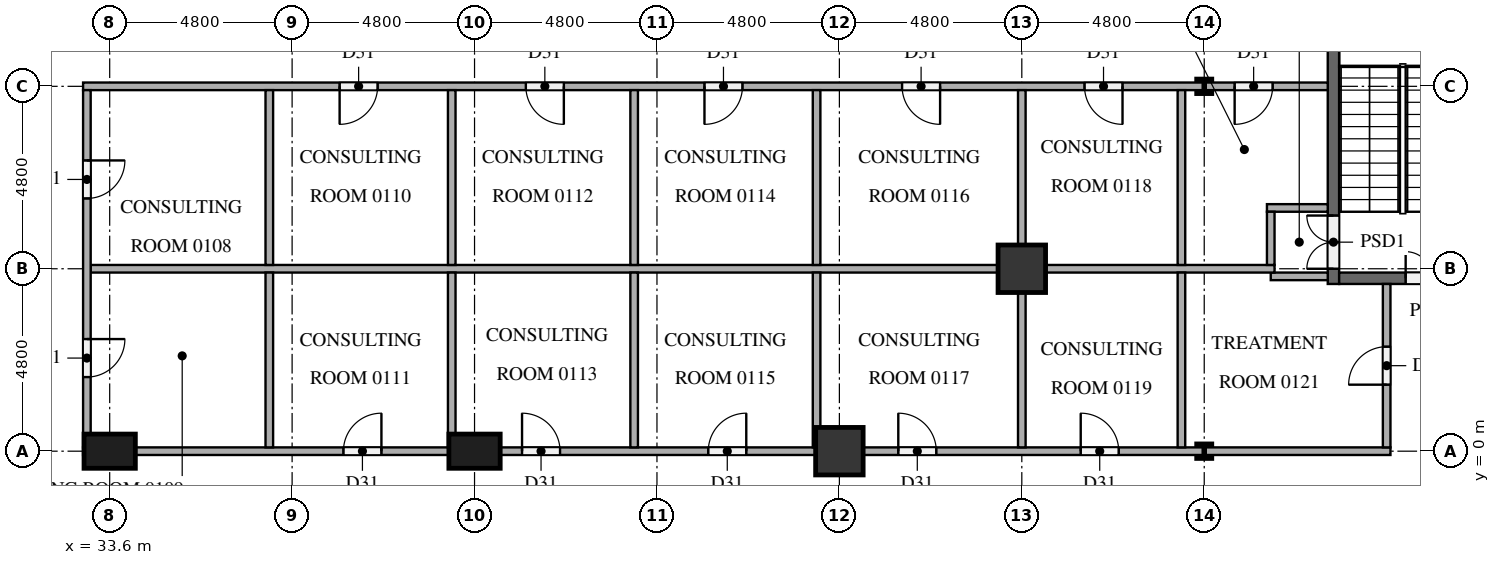
"""IFC4 building model, lengths in metres.
Left out: names, types, materials, properties, quantities, classifications, styles, units other than length and angle.
Written with IfcOpenShell. Run it as: python <this file> out.ifc"""

import sys

from ifc_helpers import new_model, si_unit, direction, frame, frame_2d, origin, origin_2d, place, context, subcontext, project, spatial, rectangle, i_section, extrude, element, fill, save


model = new_model("IFC4")
c1 = context("Model", 3, precision=1e-05, world=origin(), true_north=direction((0.0, 1.0)))
c2 = subcontext(c1, "Body", "Model", "MODEL_VIEW")
j1 = project(units=[si_unit("LENGTHUNIT", "METRE"), si_unit("PLANEANGLEUNIT", "RADIAN")], contexts=[c1])
p1 = place(None, origin())
s1 = spatial("IfcSite", under=j1, at=p1, CompositionType="ELEMENT")
p2 = place(p1, origin())
s2 = spatial("IfcBuilding", under=s1, at=p2, CompositionType="ELEMENT")
p3 = place(p2, frame((0.0, 0.0, 6.0)))
s3 = spatial("IfcBuildingStorey", under=s2, at=p3, CompositionType="ELEMENT", Elevation=6.0)
p4 = place(p3, frame((65.8, 4.4, 0.0), z_axis=(0.0, 0.0, 1.0), x_axis=(0.0, 1.0, 0.0)))
e1 = element("IfcWall", 1, at=p4, inside=s3, PredefinedType="SOLIDWALL", context=c2, shape_type="SweptSolid", body=[
    extrude(rectangle(XDim=8.0, YDim=0.3, at=frame_2d((4.0, 0.0))), origin(), (0.0, 0.0, 1.0), 4.2),
])
p5 = place(p4, frame((0.4, 0.0, 0.0)))
e2 = element("IfcOpeningElement", 2, at=p5, cuts=e1, PredefinedType="OPENING", context=c2, shape_type="SweptSolid", body=[
    extrude(rectangle(XDim=1.4, YDim=2.1, at=frame_2d((0.7, 1.05))), frame((0.0, 0.16, 0.0), z_axis=(0.0, -1.0, 0.0), x_axis=(1.0, 0.0, 0.0)), (0.0, 0.0, 1.0), 0.32),
])
p6 = place(p3, frame((65.95, 4.55, 0.0), z_axis=(0.0, 0.0, 1.0), x_axis=(1.0, 0.0, 0.0)))
e3 = element("IfcWall", 3, at=p6, inside=s3, PredefinedType="SOLIDWALL", context=c2, shape_type="SweptSolid", body=[
    extrude(rectangle(XDim=3.35, YDim=0.3, at=frame_2d((1.675, 0.0))), origin(), (0.0, 0.0, 1.0), 4.2),
])
p7 = place(p6, frame((1.75, 0.0, 0.0)))
e4 = element("IfcOpeningElement", 4, at=p7, cuts=e3, PredefinedType="OPENING", context=c2, shape_type="SweptSolid", body=[
    extrude(rectangle(XDim=1.4, YDim=2.1, at=frame_2d((0.7, 1.05))), frame((0.0, 0.16, 0.0), z_axis=(0.0, -1.0, 0.0), x_axis=(1.0, 0.0, 0.0)), (0.0, 0.0, 1.0), 0.32),
])
for number, where, z_axis, x_axis in (
    (5, (33.6, 0.0, 0.0), (0.0, 0.0, 1.0), (1.0, 0.0, 0.0)),
    (6, (43.2, 0.0, 0.0), (0.0, 0.0, 1.0), (1.0, 0.0, 0.0)),
):
    element("IfcColumn", number, at=place(p3, frame(where, z_axis=z_axis, x_axis=x_axis)), inside=s3, PredefinedType="COLUMN", context=c2, shape_type="SweptSolid", body=[
        extrude(rectangle(XDim=1.35, YDim=0.9, at=origin_2d()), origin(), (0.0, 0.0, 1.0), 4.2),
    ])
for number, where, z_axis, x_axis in (
    (7, (52.8, 0.0, 0.0), (0.0, 0.0, 1.0), (1.0, 0.0, 0.0)),
    (8, (57.6, 4.8, 0.0), (0.0, 0.0, 1.0), (1.0, 0.0, 0.0)),
):
    element("IfcColumn", number, at=place(p3, frame(where, z_axis=z_axis, x_axis=x_axis)), inside=s3, PredefinedType="COLUMN", context=c2, shape_type="SweptSolid", body=[
        extrude(rectangle(XDim=1.25, YDim=1.25, at=origin_2d()), origin(), (0.0, 0.0, 1.0), 4.2),
    ])
for number, where, z_axis, x_axis in (
    (9, (62.4, 0.0, 0.0), (0.0, 0.0, 1.0), (1.0, 0.0, 0.0)),
    (10, (62.4, 9.6, 0.0), (0.0, 0.0, 1.0), (1.0, 0.0, 0.0)),
):
    element("IfcColumn", number, at=place(p3, frame(where, z_axis=z_axis, x_axis=x_axis)), inside=s3, PredefinedType="COLUMN", context=c2, shape_type="SweptSolid", body=[
        extrude(i_section(OverallWidth=0.396, OverallDepth=0.381, WebThickness=0.019, FlangeThickness=0.03, at=origin_2d()), origin(), (0.0, 0.0, 1.0), 4.2),
    ])
p8 = place(p3, frame((32.9, 0.0, 0.0), z_axis=(0.0, 0.0, 1.0), x_axis=(1.0, 0.0, 0.0)))
e11 = element("IfcWall", 11, at=p8, inside=s3, PredefinedType="PARTITIONING", context=c2, shape_type="SweptSolid", body=[
    extrude(rectangle(XDim=34.4, YDim=0.2, at=frame_2d((17.2, 0.0))), origin(), (0.0, 0.0, 1.0), 4.2),
])
p9 = place(p8, frame((6.85, 0.0, 0.0)))
e12 = element("IfcOpeningElement", 12, at=p9, cuts=e11, PredefinedType="OPENING", context=c2, shape_type="SweptSolid", body=[
    extrude(rectangle(XDim=1.0, YDim=2.1, at=frame_2d((0.5, 1.05))), frame((0.0, 0.11, 0.0), z_axis=(0.0, -1.0, 0.0), x_axis=(1.0, 0.0, 0.0)), (0.0, 0.0, 1.0), 0.22),
])
p10 = place(p8, frame((11.55, 0.0, 0.0)))
e13 = element("IfcOpeningElement", 13, at=p10, cuts=e11, PredefinedType="OPENING", context=c2, shape_type="SweptSolid", body=[
    extrude(rectangle(XDim=1.0, YDim=2.1, at=frame_2d((0.5, 1.05))), frame((0.0, 0.11, 0.0), z_axis=(0.0, -1.0, 0.0), x_axis=(1.0, 0.0, 0.0)), (0.0, 0.0, 1.0), 0.22),
])
p11 = place(p8, frame((16.45, 0.0, 0.0)))
e14 = element("IfcOpeningElement", 14, at=p11, cuts=e11, PredefinedType="OPENING", context=c2, shape_type="SweptSolid", body=[
    extrude(rectangle(XDim=1.0, YDim=2.1, at=frame_2d((0.5, 1.05))), frame((0.0, 0.11, 0.0), z_axis=(0.0, -1.0, 0.0), x_axis=(1.0, 0.0, 0.0)), (0.0, 0.0, 1.0), 0.22),
])
p12 = place(p8, frame((21.45, 0.0, 0.0)))
e15 = element("IfcOpeningElement", 15, at=p12, cuts=e11, PredefinedType="OPENING", context=c2, shape_type="SweptSolid", body=[
    extrude(rectangle(XDim=1.0, YDim=2.1, at=frame_2d((0.5, 1.05))), frame((0.0, 0.11, 0.0), z_axis=(0.0, -1.0, 0.0), x_axis=(1.0, 0.0, 0.0)), (0.0, 0.0, 1.0), 0.22),
])
p13 = place(p8, frame((26.25, 0.0, 0.0)))
e16 = element("IfcOpeningElement", 16, at=p13, cuts=e11, PredefinedType="OPENING", context=c2, shape_type="SweptSolid", body=[
    extrude(rectangle(XDim=1.0, YDim=2.1, at=frame_2d((0.5, 1.05))), frame((0.0, 0.11, 0.0), z_axis=(0.0, -1.0, 0.0), x_axis=(1.0, 0.0, 0.0)), (0.0, 0.0, 1.0), 0.22),
])
p14 = place(p3, frame((64.15, 4.6, 0.0), z_axis=(0.0, 0.0, 1.0), x_axis=(1.0, 0.0, 0.0)))
e17 = element("IfcWall", 17, at=p14, inside=s3, PredefinedType="PARTITIONING", context=c2, shape_type="SweptSolid", body=[
    extrude(rectangle(XDim=1.5, YDim=0.2, at=frame_2d((0.75, 0.0))), origin(), (0.0, 0.0, 1.0), 4.2),
])
p15 = place(p3, frame((33.1, 4.8, 0.0), z_axis=(0.0, 0.0, 1.0), x_axis=(1.0, 0.0, 0.0)))
e18 = element("IfcWall", 18, at=p15, inside=s3, PredefinedType="PARTITIONING", context=c2, shape_type="SweptSolid", body=[
    extrude(rectangle(XDim=31.15, YDim=0.2, at=frame_2d((15.575, 0.0))), origin(), (0.0, 0.0, 1.0), 4.2),
])
p16 = place(p3, frame((64.05, 6.4, 0.0), z_axis=(0.0, 0.0, 1.0), x_axis=(1.0, 0.0, 0.0)))
e19 = element("IfcWall", 19, at=p16, inside=s3, PredefinedType="PARTITIONING", context=c2, shape_type="SweptSolid", body=[
    extrude(rectangle(XDim=1.6, YDim=0.2, at=frame_2d((0.8, 0.0))), origin(), (0.0, 0.0, 1.0), 4.2),
])
p17 = place(p3, frame((65.65, 9.6, 0.0), z_axis=(0.0, 0.0, 1.0), x_axis=(-1.0, 0.0, 0.0)))
e20 = element("IfcWall", 20, at=p17, inside=s3, PredefinedType="PARTITIONING", context=c2, shape_type="SweptSolid", body=[
    extrude(rectangle(XDim=32.75, YDim=0.2, at=frame_2d((16.375, 0.0))), origin(), (0.0, 0.0, 1.0), 4.2),
])
p18 = place(p17, frame((25.0, 0.0, 0.0)))
e21 = element("IfcOpeningElement", 21, at=p18, cuts=e20, PredefinedType="OPENING", context=c2, shape_type="SweptSolid", body=[
    extrude(rectangle(XDim=1.0, YDim=2.1, at=frame_2d((0.5, 1.05))), frame((0.0, 0.11, 0.0), z_axis=(0.0, -1.0, 0.0), x_axis=(1.0, 0.0, 0.0)), (0.0, 0.0, 1.0), 0.22),
])
p19 = place(p17, frame((20.1, 0.0, 0.0)))
e22 = element("IfcOpeningElement", 22, at=p19, cuts=e20, PredefinedType="OPENING", context=c2, shape_type="SweptSolid", body=[
    extrude(rectangle(XDim=1.0, YDim=2.1, at=frame_2d((0.5, 1.05))), frame((0.0, 0.11, 0.0), z_axis=(0.0, -1.0, 0.0), x_axis=(1.0, 0.0, 0.0)), (0.0, 0.0, 1.0), 0.22),
])
p20 = place(p17, frame((15.4, 0.0, 0.0)))
e23 = element("IfcOpeningElement", 23, at=p20, cuts=e20, PredefinedType="OPENING", context=c2, shape_type="SweptSolid", body=[
    extrude(rectangle(XDim=1.0, YDim=2.1, at=frame_2d((0.5, 1.05))), frame((0.0, 0.11, 0.0), z_axis=(0.0, -1.0, 0.0), x_axis=(1.0, 0.0, 0.0)), (0.0, 0.0, 1.0), 0.22),
])
p21 = place(p17, frame((10.2, 0.0, 0.0)))
e24 = element("IfcOpeningElement", 24, at=p21, cuts=e20, PredefinedType="OPENING", context=c2, shape_type="SweptSolid", body=[
    extrude(rectangle(XDim=1.0, YDim=2.1, at=frame_2d((0.5, 1.05))), frame((0.0, 0.11, 0.0), z_axis=(0.0, -1.0, 0.0), x_axis=(1.0, 0.0, 0.0)), (0.0, 0.0, 1.0), 0.22),
])
p22 = place(p17, frame((5.4, 0.0, 0.0)))
e25 = element("IfcOpeningElement", 25, at=p22, cuts=e20, PredefinedType="OPENING", context=c2, shape_type="SweptSolid", body=[
    extrude(rectangle(XDim=1.0, YDim=2.1, at=frame_2d((0.5, 1.05))), frame((0.0, 0.11, 0.0), z_axis=(0.0, -1.0, 0.0), x_axis=(1.0, 0.0, 0.0)), (0.0, 0.0, 1.0), 0.22),
])
p23 = place(p17, frame((1.45, 0.0, 0.0)))
e26 = element("IfcOpeningElement", 26, at=p23, cuts=e20, PredefinedType="OPENING", context=c2, shape_type="SweptSolid", body=[
    extrude(rectangle(XDim=1.0, YDim=2.1, at=frame_2d((0.5, 1.05))), frame((0.0, 0.11, 0.0), z_axis=(0.0, -1.0, 0.0), x_axis=(1.0, 0.0, 0.0)), (0.0, 0.0, 1.0), 0.22),
])
p24 = place(p3, frame((33.0, 9.5, 0.0), z_axis=(0.0, 0.0, 1.0), x_axis=(0.0, -1.0, 0.0)))
e27 = element("IfcWall", 27, at=p24, inside=s3, PredefinedType="PARTITIONING", context=c2, shape_type="SweptSolid", body=[
    extrude(rectangle(XDim=9.4, YDim=0.2, at=frame_2d((4.7, 0.0))), origin(), (0.0, 0.0, 1.0), 4.2),
])
p25 = place(p24, frame((1.85, 0.0, 0.0)))
e28 = element("IfcOpeningElement", 28, at=p25, cuts=e27, PredefinedType="OPENING", context=c2, shape_type="SweptSolid", body=[
    extrude(rectangle(XDim=1.0, YDim=2.1, at=frame_2d((0.5, 1.05))), frame((0.0, 0.11, 0.0), z_axis=(0.0, -1.0, 0.0), x_axis=(1.0, 0.0, 0.0)), (0.0, 0.0, 1.0), 0.22),
])
p26 = place(p24, frame((6.55, 0.0, 0.0)))
e29 = element("IfcOpeningElement", 29, at=p26, cuts=e27, PredefinedType="OPENING", context=c2, shape_type="SweptSolid", body=[
    extrude(rectangle(XDim=1.0, YDim=2.1, at=frame_2d((0.5, 1.05))), frame((0.0, 0.11, 0.0), z_axis=(0.0, -1.0, 0.0), x_axis=(1.0, 0.0, 0.0)), (0.0, 0.0, 1.0), 0.22),
])
p27 = place(p3, frame((37.8, 0.1, 0.0), z_axis=(0.0, 0.0, 1.0), x_axis=(0.0, 1.0, 0.0)))
e30 = element("IfcWall", 30, at=p27, inside=s3, PredefinedType="PARTITIONING", context=c2, shape_type="SweptSolid", body=[
    extrude(rectangle(XDim=4.6, YDim=0.2, at=frame_2d((2.3, 0.0))), origin(), (0.0, 0.0, 1.0), 4.2),
])
p28 = place(p3, frame((37.8, 4.9, 0.0), z_axis=(0.0, 0.0, 1.0), x_axis=(0.0, 1.0, 0.0)))
e31 = element("IfcWall", 31, at=p28, inside=s3, PredefinedType="PARTITIONING", context=c2, shape_type="SweptSolid", body=[
    extrude(rectangle(XDim=4.6, YDim=0.2, at=frame_2d((2.3, 0.0))), origin(), (0.0, 0.0, 1.0), 4.2),
])
p29 = place(p3, frame((42.6, 0.1, 0.0), z_axis=(0.0, 0.0, 1.0), x_axis=(0.0, 1.0, 0.0)))
e32 = element("IfcWall", 32, at=p29, inside=s3, PredefinedType="PARTITIONING", context=c2, shape_type="SweptSolid", body=[
    extrude(rectangle(XDim=4.6, YDim=0.2, at=frame_2d((2.3, 0.0))), origin(), (0.0, 0.0, 1.0), 4.2),
])
p30 = place(p3, frame((42.6, 4.9, 0.0), z_axis=(0.0, 0.0, 1.0), x_axis=(0.0, 1.0, 0.0)))
e33 = element("IfcWall", 33, at=p30, inside=s3, PredefinedType="PARTITIONING", context=c2, shape_type="SweptSolid", body=[
    extrude(rectangle(XDim=4.6, YDim=0.2, at=frame_2d((2.3, 0.0))), origin(), (0.0, 0.0, 1.0), 4.2),
])
p31 = place(p3, frame((47.4, 0.1, 0.0), z_axis=(0.0, 0.0, 1.0), x_axis=(0.0, 1.0, 0.0)))
e34 = element("IfcWall", 34, at=p31, inside=s3, PredefinedType="PARTITIONING", context=c2, shape_type="SweptSolid", body=[
    extrude(rectangle(XDim=4.6, YDim=0.2, at=frame_2d((2.3, 0.0))), origin(), (0.0, 0.0, 1.0), 4.2),
])
p32 = place(p3, frame((47.4, 4.9, 0.0), z_axis=(0.0, 0.0, 1.0), x_axis=(0.0, 1.0, 0.0)))
e35 = element("IfcWall", 35, at=p32, inside=s3, PredefinedType="PARTITIONING", context=c2, shape_type="SweptSolid", body=[
    extrude(rectangle(XDim=4.6, YDim=0.2, at=frame_2d((2.3, 0.0))), origin(), (0.0, 0.0, 1.0), 4.2),
])
p33 = place(p3, frame((52.2, 0.1, 0.0), z_axis=(0.0, 0.0, 1.0), x_axis=(0.0, 1.0, 0.0)))
e36 = element("IfcWall", 36, at=p33, inside=s3, PredefinedType="PARTITIONING", context=c2, shape_type="SweptSolid", body=[
    extrude(rectangle(XDim=4.6, YDim=0.2, at=frame_2d((2.3, 0.0))), origin(), (0.0, 0.0, 1.0), 4.2),
])
p34 = place(p3, frame((52.2, 4.9, 0.0), z_axis=(0.0, 0.0, 1.0), x_axis=(0.0, 1.0, 0.0)))
e37 = element("IfcWall", 37, at=p34, inside=s3, PredefinedType="PARTITIONING", context=c2, shape_type="SweptSolid", body=[
    extrude(rectangle(XDim=4.6, YDim=0.2, at=frame_2d((2.3, 0.0))), origin(), (0.0, 0.0, 1.0), 4.2),
])
p35 = place(p3, frame((57.6, 0.1, 0.0), z_axis=(0.0, 0.0, 1.0), x_axis=(0.0, 1.0, 0.0)))
e38 = element("IfcWall", 38, at=p35, inside=s3, PredefinedType="PARTITIONING", context=c2, shape_type="SweptSolid", body=[
    extrude(rectangle(XDim=4.6, YDim=0.2, at=frame_2d((2.3, 0.0))), origin(), (0.0, 0.0, 1.0), 4.2),
])
p36 = place(p3, frame((57.6, 4.9, 0.0), z_axis=(0.0, 0.0, 1.0), x_axis=(0.0, 1.0, 0.0)))
e39 = element("IfcWall", 39, at=p36, inside=s3, PredefinedType="PARTITIONING", context=c2, shape_type="SweptSolid", body=[
    extrude(rectangle(XDim=4.6, YDim=0.2, at=frame_2d((2.3, 0.0))), origin(), (0.0, 0.0, 1.0), 4.2),
])
p37 = place(p3, frame((61.8, 0.1, 0.0), z_axis=(0.0, 0.0, 1.0), x_axis=(0.0, 1.0, 0.0)))
e40 = element("IfcWall", 40, at=p37, inside=s3, PredefinedType="PARTITIONING", context=c2, shape_type="SweptSolid", body=[
    extrude(rectangle(XDim=4.6, YDim=0.2, at=frame_2d((2.3, 0.0))), origin(), (0.0, 0.0, 1.0), 4.2),
])
p38 = place(p3, frame((61.8, 4.9, 0.0), z_axis=(0.0, 0.0, 1.0), x_axis=(0.0, 1.0, 0.0)))
e41 = element("IfcWall", 41, at=p38, inside=s3, PredefinedType="PARTITIONING", context=c2, shape_type="SweptSolid", body=[
    extrude(rectangle(XDim=4.6, YDim=0.2, at=frame_2d((2.3, 0.0))), origin(), (0.0, 0.0, 1.0), 4.2),
])
p39 = place(p3, frame((64.15, 4.9, 0.0), z_axis=(0.0, 0.0, 1.0), x_axis=(0.0, 1.0, 0.0)))
e42 = element("IfcWall", 42, at=p39, inside=s3, PredefinedType="PARTITIONING", context=c2, shape_type="SweptSolid", body=[
    extrude(rectangle(XDim=1.4, YDim=0.2, at=frame_2d((0.7, 0.0))), origin(), (0.0, 0.0, 1.0), 4.2),
])
p40 = place(p3, frame((67.2, 0.1, 0.0), z_axis=(0.0, 0.0, 1.0), x_axis=(0.0, 1.0, 0.0)))
e43 = element("IfcWall", 43, at=p40, inside=s3, PredefinedType="PARTITIONING", context=c2, shape_type="SweptSolid", body=[
    extrude(rectangle(XDim=4.3, YDim=0.2, at=frame_2d((2.15, 0.0))), origin(), (0.0, 0.0, 1.0), 4.2),
])
p41 = place(p40, frame((1.65, 0.0, 0.0)))
e44 = element("IfcOpeningElement", 44, at=p41, cuts=e43, PredefinedType="OPENING", context=c2, shape_type="SweptSolid", body=[
    extrude(rectangle(XDim=1.0, YDim=2.1, at=frame_2d((0.5, 1.05))), frame((0.0, 0.11, 0.0), z_axis=(0.0, -1.0, 0.0), x_axis=(1.0, 0.0, 0.0)), (0.0, 0.0, 1.0), 0.22),
])
p42 = place(p5, frame((1.4, 0.0, 0.0), z_axis=(0.0, 0.0, 1.0), x_axis=(-1.0, 0.0, 0.0)))
e45 = element("IfcDoor", 45, at=p42, inside=s3, OperationType="DOUBLE_DOOR_SINGLE_SWING", PredefinedType="DOOR", context=c2, shape_type="SweptSolid", body=[
    extrude(rectangle(XDim=1.4, YDim=2.1, at=frame_2d((0.7, 1.05))), frame((0.0, 0.025, 0.0), z_axis=(0.0, -1.0, 0.0), x_axis=(1.0, 0.0, 0.0)), (0.0, 0.0, 1.0), 0.05),
])
fill(e2, e45)
p43 = place(p7, origin())
e46 = element("IfcDoor", 46, at=p43, inside=s3, OperationType="DOUBLE_DOOR_SINGLE_SWING", PredefinedType="DOOR", context=c2, shape_type="SweptSolid", body=[
    extrude(rectangle(XDim=1.4, YDim=2.1, at=frame_2d((0.7, 1.05))), frame((0.0, 0.025, 0.0), z_axis=(0.0, -1.0, 0.0), x_axis=(1.0, 0.0, 0.0)), (0.0, 0.0, 1.0), 0.05),
])
fill(e4, e46)
p44 = place(p25, origin())
e47 = element("IfcDoor", 47, at=p44, inside=s3, OperationType="SINGLE_SWING_LEFT", PredefinedType="DOOR", context=c2, shape_type="SweptSolid", body=[
    extrude(rectangle(XDim=1.0, YDim=2.1, at=frame_2d((0.5, 1.05))), frame((0.0, 0.025, 0.0), z_axis=(0.0, -1.0, 0.0), x_axis=(1.0, 0.0, 0.0)), (0.0, 0.0, 1.0), 0.05),
])
fill(e28, e47)
p45 = place(p26, origin())
e48 = element("IfcDoor", 48, at=p45, inside=s3, OperationType="SINGLE_SWING_LEFT", PredefinedType="DOOR", context=c2, shape_type="SweptSolid", body=[
    extrude(rectangle(XDim=1.0, YDim=2.1, at=frame_2d((0.5, 1.05))), frame((0.0, 0.025, 0.0), z_axis=(0.0, -1.0, 0.0), x_axis=(1.0, 0.0, 0.0)), (0.0, 0.0, 1.0), 0.05),
])
fill(e29, e48)
p46 = place(p18, origin())
e49 = element("IfcDoor", 49, at=p46, inside=s3, OperationType="SINGLE_SWING_RIGHT", PredefinedType="DOOR", context=c2, shape_type="SweptSolid", body=[
    extrude(rectangle(XDim=1.0, YDim=2.1, at=frame_2d((0.5, 1.05))), frame((0.0, 0.025, 0.0), z_axis=(0.0, -1.0, 0.0), x_axis=(1.0, 0.0, 0.0)), (0.0, 0.0, 1.0), 0.05),
])
fill(e21, e49)
p47 = place(p9, origin())
e50 = element("IfcDoor", 50, at=p47, inside=s3, OperationType="SINGLE_SWING_RIGHT", PredefinedType="DOOR", context=c2, shape_type="SweptSolid", body=[
    extrude(rectangle(XDim=1.0, YDim=2.1, at=frame_2d((0.5, 1.05))), frame((0.0, 0.025, 0.0), z_axis=(0.0, -1.0, 0.0), x_axis=(1.0, 0.0, 0.0)), (0.0, 0.0, 1.0), 0.05),
])
fill(e12, e50)
p48 = place(p19, origin())
e51 = element("IfcDoor", 51, at=p48, inside=s3, OperationType="SINGLE_SWING_LEFT", PredefinedType="DOOR", context=c2, shape_type="SweptSolid", body=[
    extrude(rectangle(XDim=1.0, YDim=2.1, at=frame_2d((0.5, 1.05))), frame((0.0, 0.025, 0.0), z_axis=(0.0, -1.0, 0.0), x_axis=(1.0, 0.0, 0.0)), (0.0, 0.0, 1.0), 0.05),
])
fill(e22, e51)
p49 = place(p10, origin())
e52 = element("IfcDoor", 52, at=p49, inside=s3, OperationType="SINGLE_SWING_LEFT", PredefinedType="DOOR", context=c2, shape_type="SweptSolid", body=[
    extrude(rectangle(XDim=1.0, YDim=2.1, at=frame_2d((0.5, 1.05))), frame((0.0, 0.025, 0.0), z_axis=(0.0, -1.0, 0.0), x_axis=(1.0, 0.0, 0.0)), (0.0, 0.0, 1.0), 0.05),
])
fill(e13, e52)
p50 = place(p20, origin())
e53 = element("IfcDoor", 53, at=p50, inside=s3, OperationType="SINGLE_SWING_RIGHT", PredefinedType="DOOR", context=c2, shape_type="SweptSolid", body=[
    extrude(rectangle(XDim=1.0, YDim=2.1, at=frame_2d((0.5, 1.05))), frame((0.0, 0.025, 0.0), z_axis=(0.0, -1.0, 0.0), x_axis=(1.0, 0.0, 0.0)), (0.0, 0.0, 1.0), 0.05),
])
fill(e23, e53)
p51 = place(p11, origin())
e54 = element("IfcDoor", 54, at=p51, inside=s3, OperationType="SINGLE_SWING_RIGHT", PredefinedType="DOOR", context=c2, shape_type="SweptSolid", body=[
    extrude(rectangle(XDim=1.0, YDim=2.1, at=frame_2d((0.5, 1.05))), frame((0.0, 0.025, 0.0), z_axis=(0.0, -1.0, 0.0), x_axis=(1.0, 0.0, 0.0)), (0.0, 0.0, 1.0), 0.05),
])
fill(e14, e54)
p52 = place(p21, origin())
e55 = element("IfcDoor", 55, at=p52, inside=s3, OperationType="SINGLE_SWING_LEFT", PredefinedType="DOOR", context=c2, shape_type="SweptSolid", body=[
    extrude(rectangle(XDim=1.0, YDim=2.1, at=frame_2d((0.5, 1.05))), frame((0.0, 0.025, 0.0), z_axis=(0.0, -1.0, 0.0), x_axis=(1.0, 0.0, 0.0)), (0.0, 0.0, 1.0), 0.05),
])
fill(e24, e55)
p53 = place(p12, origin())
e56 = element("IfcDoor", 56, at=p53, inside=s3, OperationType="SINGLE_SWING_LEFT", PredefinedType="DOOR", context=c2, shape_type="SweptSolid", body=[
    extrude(rectangle(XDim=1.0, YDim=2.1, at=frame_2d((0.5, 1.05))), frame((0.0, 0.025, 0.0), z_axis=(0.0, -1.0, 0.0), x_axis=(1.0, 0.0, 0.0)), (0.0, 0.0, 1.0), 0.05),
])
fill(e15, e56)
p54 = place(p22, origin())
e57 = element("IfcDoor", 57, at=p54, inside=s3, OperationType="SINGLE_SWING_LEFT", PredefinedType="DOOR", context=c2, shape_type="SweptSolid", body=[
    extrude(rectangle(XDim=1.0, YDim=2.1, at=frame_2d((0.5, 1.05))), frame((0.0, 0.025, 0.0), z_axis=(0.0, -1.0, 0.0), x_axis=(1.0, 0.0, 0.0)), (0.0, 0.0, 1.0), 0.05),
])
fill(e25, e57)
p55 = place(p13, origin())
e58 = element("IfcDoor", 58, at=p55, inside=s3, OperationType="SINGLE_SWING_LEFT", PredefinedType="DOOR", context=c2, shape_type="SweptSolid", body=[
    extrude(rectangle(XDim=1.0, YDim=2.1, at=frame_2d((0.5, 1.05))), frame((0.0, 0.025, 0.0), z_axis=(0.0, -1.0, 0.0), x_axis=(1.0, 0.0, 0.0)), (0.0, 0.0, 1.0), 0.05),
])
fill(e16, e58)
p56 = place(p23, origin())
e59 = element("IfcDoor", 59, at=p56, inside=s3, OperationType="SINGLE_SWING_RIGHT", PredefinedType="DOOR", context=c2, shape_type="SweptSolid", body=[
    extrude(rectangle(XDim=1.0, YDim=2.1, at=frame_2d((0.5, 1.05))), frame((0.0, 0.025, 0.0), z_axis=(0.0, -1.0, 0.0), x_axis=(1.0, 0.0, 0.0)), (0.0, 0.0, 1.0), 0.05),
])
fill(e26, e59)
p57 = place(p41, origin())
e60 = element("IfcDoor", 60, at=p57, inside=s3, OperationType="SINGLE_SWING_LEFT", PredefinedType="DOOR", context=c2, shape_type="SweptSolid", body=[
    extrude(rectangle(XDim=1.0, YDim=2.1, at=frame_2d((0.5, 1.05))), frame((0.0, 0.025, 0.0), z_axis=(0.0, -1.0, 0.0), x_axis=(1.0, 0.0, 0.0)), (0.0, 0.0, 1.0), 0.05),
])
fill(e44, e60)
save(model, sys.argv[1])
